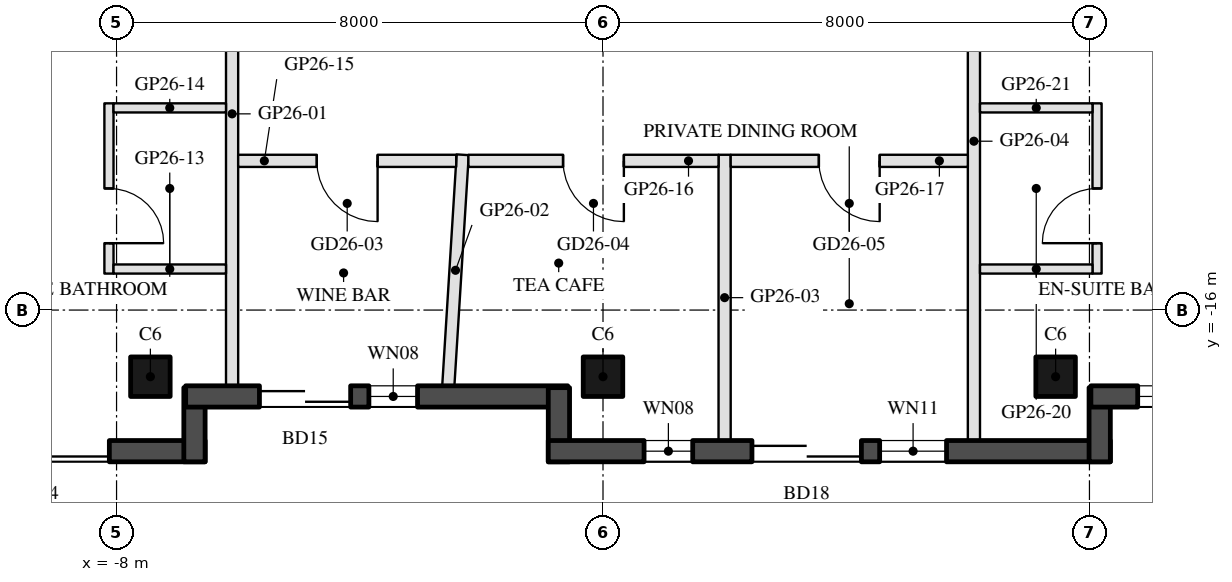
"""IFC4 building model, lengths in metres.
Left out: names, types, materials, properties, quantities, classifications, styles, units other than length and angle.
Written with IfcOpenShell. Run it as: python <this file> out.ifc"""

import sys

from ifc_helpers import new_model, si_unit, direction, frame, frame_2d, origin, origin_2d, place, context, subcontext, project, spatial, rectangle, hollow_rectangle, extrude, boolean, halfspace, element, fill, save


model = new_model("IFC4")
c1 = context("Model", 3, precision=1e-05, world=origin(), true_north=direction((0.0, 1.0)))
c2 = subcontext(c1, "Body", "Model", "MODEL_VIEW")
j1 = project(units=[si_unit("LENGTHUNIT", "METRE"), si_unit("PLANEANGLEUNIT", "RADIAN")], contexts=[c1])
p1 = place(None, origin())
s1 = spatial("IfcSite", under=j1, at=p1, CompositionType="ELEMENT")
p2 = place(p1, origin())
s2 = spatial("IfcBuilding", under=s1, at=p2, CompositionType="ELEMENT")
p3 = place(p2, frame((0.0, 0.0, 268.9)))
s3 = spatial("IfcBuildingStorey", under=s2, at=p3, CompositionType="ELEMENT", Elevation=268.9)
p4 = place(p3, frame((-7.444, -17.096, 0.0), z_axis=(0.0, 0.0, 1.0), x_axis=(-1.0, 0.0, 0.0)))
e1 = element("IfcColumn", 1, at=p4, inside=s3, PredefinedType="COLUMN", context=c2, shape_type="SweptSolid", body=[
    boolean("DIFFERENCE", extrude(hollow_rectangle(XDim=0.65, YDim=0.65, WallThickness=0.03, at=origin_2d()), origin(), (0.0, 0.0, 1.0), 3.7), halfspace(frame((0.0, 0.0, 0.04), z_axis=(0.0, 0.0, 1.0), x_axis=(1.0, 0.0, 0.0)), True)),
])
p5 = place(p3, frame((0.0, -17.096, 0.0), z_axis=(0.0, 0.0, 1.0), x_axis=(-1.0, 0.0, 0.0)))
e2 = element("IfcColumn", 2, at=p5, inside=s3, PredefinedType="COLUMN", context=c2, shape_type="SweptSolid", body=[
    boolean("DIFFERENCE", extrude(hollow_rectangle(XDim=0.65, YDim=0.65, WallThickness=0.03, at=origin_2d()), origin(), (0.0, 0.0, 1.0), 3.7), halfspace(frame((0.0, 0.0, 0.037), z_axis=(0.0, 0.0, 1.0), x_axis=(1.0, 0.0, 0.0)), True)),
])
p6 = place(p3, frame((7.444, -17.096, 0.0), z_axis=(0.0, 0.0, 1.0), x_axis=(-1.0, 0.0, 0.0)))
e3 = element("IfcColumn", 3, at=p6, inside=s3, PredefinedType="COLUMN", context=c2, shape_type="SweptSolid", body=[
    boolean("DIFFERENCE", extrude(hollow_rectangle(XDim=0.65, YDim=0.65, WallThickness=0.03, at=origin_2d()), origin(), (0.0, 0.0, 1.0), 3.7), halfspace(frame((0.0, 0.0, 0.04), z_axis=(0.0, 0.0, 1.0), x_axis=(1.0, 0.0, 0.0)), True)),
])
p7 = place(p3, frame((-17.729, -18.321, 0.0), z_axis=(0.0, 0.0, 1.0), x_axis=(1.0, 0.0, 0.0)))
e4 = element("IfcWall", 4, at=p7, inside=s3, PredefinedType="SOLIDWALL", context=c2, shape_type="SweptSolid", body=[
    extrude(rectangle(XDim=11.185, YDim=0.35, at=frame_2d((5.593, 0.0))), origin(), (0.0, 0.0, 1.0), 3.55),
])
p8 = place(p7, frame((0.381, 0.0, 0.3)))
e5 = element("IfcOpeningElement", 5, at=p8, cuts=e4, PredefinedType="OPENING", context=c2, shape_type="SweptSolid", body=[
    extrude(rectangle(XDim=1.7, YDim=2.65, at=frame_2d((0.85, 1.325))), frame((0.0, 0.185, 0.0), z_axis=(0.0, -1.0, 0.0), x_axis=(1.0, 0.0, 0.0)), (0.0, 0.0, 1.0), 0.37),
])
p9 = place(p7, frame((7.21, 0.0, 0.0)))
e6 = element("IfcOpeningElement", 6, at=p9, cuts=e4, PredefinedType="OPENING", context=c2, shape_type="SweptSolid", body=[
    extrude(rectangle(XDim=2.4, YDim=2.4, at=frame_2d((1.2, 1.2))), frame((0.0, 0.185, 0.0), z_axis=(0.0, -1.0, 0.0), x_axis=(1.0, 0.0, 0.0)), (0.0, 0.0, 1.0), 0.37),
])
p10 = place(p7, frame((3.516, 0.0, 0.3)))
e7 = element("IfcOpeningElement", 7, at=p10, cuts=e4, PredefinedType="OPENING", context=c2, shape_type="SweptSolid", body=[
    extrude(rectangle(XDim=1.5, YDim=2.65, at=frame_2d((0.75, 1.325))), frame((0.0, 0.185, 0.0), z_axis=(0.0, -1.0, 0.0), x_axis=(1.0, 0.0, 0.0)), (0.0, 0.0, 1.0), 0.37),
])
p11 = place(p7, frame((5.316, 0.0, 0.3)))
e8 = element("IfcOpeningElement", 8, at=p11, cuts=e4, PredefinedType="OPENING", context=c2, shape_type="SweptSolid", body=[
    extrude(rectangle(XDim=1.5, YDim=2.65, at=frame_2d((0.75, 1.325))), frame((0.0, 0.185, 0.0), z_axis=(0.0, -1.0, 0.0), x_axis=(1.0, 0.0, 0.0)), (0.0, 0.0, 1.0), 0.37),
])
p12 = place(p3, frame((-6.719, -18.496, 0.0), z_axis=(0.0, 0.0, 1.0), x_axis=(0.0, 1.0, 0.0)))
e9 = element("IfcWall", 9, at=p12, inside=s3, PredefinedType="SOLIDWALL", context=c2, shape_type="SweptSolid", body=[
    extrude(rectangle(XDim=1.22, YDim=0.35, at=frame_2d((0.61, 0.0))), origin(), (0.0, 0.0, 1.0), 3.55),
])
p13 = place(p3, frame((-6.864, -17.421, 0.0), z_axis=(0.0, 0.0, 1.0), x_axis=(1.0, 0.0, 0.0)))
e10 = element("IfcWall", 10, at=p13, inside=s3, PredefinedType="SOLIDWALL", context=c2, shape_type="SweptSolid", body=[
    extrude(rectangle(XDim=6.283, YDim=0.35, at=frame_2d((3.142, 0.0))), origin(), (0.0, 0.0, 1.0), 3.55),
])
p14 = place(p13, frame((1.213, 0.0, 0.0)))
e11 = element("IfcOpeningElement", 11, at=p14, cuts=e10, PredefinedType="OPENING", context=c2, shape_type="SweptSolid", body=[
    extrude(rectangle(XDim=1.5, YDim=2.4, at=frame_2d((0.75, 1.2))), frame((0.0, 0.185, 0.0), z_axis=(0.0, -1.0, 0.0), x_axis=(1.0, 0.0, 0.0)), (0.0, 0.0, 1.0), 0.37),
])
p15 = place(p13, frame((3.013, 0.0, 0.3)))
e12 = element("IfcOpeningElement", 12, at=p15, cuts=e10, PredefinedType="OPENING", context=c2, shape_type="SweptSolid", body=[
    extrude(rectangle(XDim=0.8, YDim=2.65, at=frame_2d((0.4, 1.325))), frame((0.0, 0.185, 0.0), z_axis=(0.0, -1.0, 0.0), x_axis=(1.0, 0.0, 0.0)), (0.0, 0.0, 1.0), 0.37),
])
p16 = place(p3, frame((-0.725, -17.276, 0.0), z_axis=(0.0, 0.0, 1.0), x_axis=(0.0, -1.0, 0.0)))
e13 = element("IfcWall", 13, at=p16, inside=s3, PredefinedType="SOLIDWALL", context=c2, shape_type="SweptSolid", body=[
    extrude(rectangle(XDim=1.22, YDim=0.35, at=frame_2d((0.61, 0.0))), origin(), (0.0, 0.0, 1.0), 3.55),
])
p17 = place(p3, frame((-0.9, -18.321, 0.0), z_axis=(0.0, 0.0, 1.0), x_axis=(1.0, 0.0, 0.0)))
e14 = element("IfcWall", 14, at=p17, inside=s3, PredefinedType="SOLIDWALL", context=c2, shape_type="SweptSolid", body=[
    extrude(rectangle(XDim=9.243, YDim=0.35, at=frame_2d((4.622, 0.0))), origin(), (0.0, 0.0, 1.0), 3.55),
])
p18 = place(p17, frame((1.575, 0.0, 0.3)))
e15 = element("IfcOpeningElement", 15, at=p18, cuts=e14, PredefinedType="OPENING", context=c2, shape_type="SweptSolid", body=[
    extrude(rectangle(XDim=0.8, YDim=2.65, at=frame_2d((0.4, 1.325))), frame((0.0, 0.185, 0.0), z_axis=(0.0, -1.0, 0.0), x_axis=(1.0, 0.0, 0.0)), (0.0, 0.0, 1.0), 0.37),
])
p19 = place(p17, frame((3.35, 0.0, 0.0)))
e16 = element("IfcOpeningElement", 16, at=p19, cuts=e14, PredefinedType="OPENING", context=c2, shape_type="SweptSolid", body=[
    extrude(rectangle(XDim=1.8, YDim=2.4, at=frame_2d((0.9, 1.2))), frame((0.0, 0.185, 0.0), z_axis=(0.0, -1.0, 0.0), x_axis=(1.0, 0.0, 0.0)), (0.0, 0.0, 1.0), 0.37),
])
p20 = place(p17, frame((5.45, 0.0, 0.3)))
e17 = element("IfcOpeningElement", 17, at=p20, cuts=e14, PredefinedType="OPENING", context=c2, shape_type="SweptSolid", body=[
    extrude(rectangle(XDim=1.1, YDim=2.65, at=frame_2d((0.55, 1.325))), frame((0.0, 0.185, 0.0), z_axis=(0.0, -1.0, 0.0), x_axis=(1.0, 0.0, 0.0)), (0.0, 0.0, 1.0), 0.37),
])
p21 = place(p3, frame((8.169, -18.496, 0.0), z_axis=(0.0, 0.0, 1.0), x_axis=(0.0, 1.0, 0.0)))
e18 = element("IfcWall", 18, at=p21, inside=s3, PredefinedType="SOLIDWALL", context=c2, shape_type="SweptSolid", body=[
    extrude(rectangle(XDim=1.22, YDim=0.35, at=frame_2d((0.61, 0.0))), origin(), (0.0, 0.0, 1.0), 3.55),
])
p22 = place(p3, frame((8.024, -17.421, 0.0), z_axis=(0.0, 0.0, 1.0), x_axis=(1.0, 0.0, 0.0)))
e19 = element("IfcWall", 19, at=p22, inside=s3, PredefinedType="SOLIDWALL", context=c2, shape_type="SweptSolid", body=[
    extrude(rectangle(XDim=6.283, YDim=0.35, at=frame_2d((3.142, 0.0))), origin(), (0.0, 0.0, 1.0), 3.55),
])
p23 = place(p22, frame((3.563, 0.0, 0.0)))
e20 = element("IfcOpeningElement", 20, at=p23, cuts=e19, PredefinedType="OPENING", context=c2, shape_type="SweptSolid", body=[
    extrude(rectangle(XDim=2.4, YDim=2.4, at=frame_2d((1.2, 1.2))), frame((0.0, 0.185, 0.0), z_axis=(0.0, -1.0, 0.0), x_axis=(1.0, 0.0, 0.0)), (0.0, 0.0, 1.0), 0.37),
])
p24 = place(p22, frame((0.77, 0.0, 0.3)))
e21 = element("IfcOpeningElement", 21, at=p24, cuts=e19, PredefinedType="OPENING", context=c2, shape_type="SweptSolid", body=[
    extrude(rectangle(XDim=2.4, YDim=2.65, at=frame_2d((1.2, 1.325))), frame((0.0, 0.185, 0.0), z_axis=(0.0, -1.0, 0.0), x_axis=(1.0, 0.0, 0.0)), (0.0, 0.0, 1.0), 0.37),
])
for number, where, z_axis, x_axis in (
    (22, (-8.547, -10.997, 0.0), (0.0, 0.0, 1.0), (-0.866, -0.5, 0.0)),
    (23, (8.547, -10.997, 0.0), (0.0, 0.0, 1.0), (0.866, -0.5, 0.0)),
):
    element("IfcWall", number, at=place(p3, frame(where, z_axis=z_axis, x_axis=x_axis)), inside=s3, PredefinedType="SHEAR", context=c2, shape_type="SweptSolid", body=[
        extrude(rectangle(XDim=13.031, YDim=0.5, at=frame_2d((6.516, 0.0))), origin(), (0.0, 0.0, 1.0), 3.5),
    ])
p25 = place(p3, frame((-6.1, -17.246, 0.0), z_axis=(0.0, 0.0, 1.0), x_axis=(0.0, 1.0, 0.0)))
e24 = element("IfcWall", 24, at=p25, inside=s3, PredefinedType="PARTITIONING", context=c2, shape_type="SweptSolid", body=[
    extrude(rectangle(XDim=8.946, YDim=0.2, at=frame_2d((4.473, 0.0))), origin(), (0.0, 0.0, 1.0), 3.16),
])
p26 = place(p3, frame((-2.544, -17.246, 0.0), z_axis=(0.0, 0.0, 1.0), x_axis=(0.062070892854, 0.998071743043, 0.0)))
e25 = element("IfcWall", 25, at=p26, inside=s3, PredefinedType="PARTITIONING", context=c2, shape_type="SweptSolid", body=[
    extrude(rectangle(XDim=3.807, YDim=0.2, at=frame_2d((1.904, 0.0))), origin(), (0.0, 0.0, 1.0), 3.16),
])
p27 = place(p3, frame((2.0, -18.146, 0.0), z_axis=(0.0, 0.0, 1.0), x_axis=(0.0, 1.0, 0.0)))
e26 = element("IfcWall", 26, at=p27, inside=s3, PredefinedType="PARTITIONING", context=c2, shape_type="SweptSolid", body=[
    extrude(rectangle(XDim=4.7, YDim=0.2, at=frame_2d((2.35, 0.0))), origin(), (0.0, 0.0, 1.0), 3.16),
])
p28 = place(p3, frame((6.1, -18.146, 0.0), z_axis=(0.0, 0.0, 1.0), x_axis=(0.0, 1.0, 0.0)))
e27 = element("IfcWall", 27, at=p28, inside=s3, PredefinedType="PARTITIONING", context=c2, shape_type="SweptSolid", body=[
    extrude(rectangle(XDim=9.846, YDim=0.2, at=frame_2d((4.923, 0.0))), origin(), (0.0, 0.0, 1.0), 3.16),
])
p29 = place(p3, frame((-8.125, -12.6, 0.0), z_axis=(0.0, 0.0, 1.0), x_axis=(0.0, -1.0, 0.0)))
e28 = element("IfcWall", 28, at=p29, inside=s3, PredefinedType="PARTITIONING", context=c2, shape_type="SweptSolid", body=[
    extrude(rectangle(XDim=2.8, YDim=0.15, at=frame_2d((1.4, 0.0))), origin(), (0.0, 0.0, 1.0), 3.55),
])
p30 = place(p29, frame((1.4, 0.0, 0.0)))
e29 = element("IfcOpeningElement", 29, at=p30, cuts=e28, PredefinedType="OPENING", context=c2, shape_type="SweptSolid", body=[
    extrude(rectangle(XDim=0.9, YDim=2.1, at=frame_2d((0.45, 1.05))), frame((0.0, 0.085, 0.0), z_axis=(0.0, -1.0, 0.0), x_axis=(1.0, 0.0, 0.0)), (0.0, 0.0, 1.0), 0.17),
])
for number, where, z_axis, x_axis in (
    (30, (-8.05, -15.325, 0.0), (0.0, 0.0, 1.0), (1.0, 0.0, 0.0)),
    (31, (-8.05, -12.675, 0.0), (0.0, 0.0, 1.0), (1.0, 0.0, 0.0)),
):
    element("IfcWall", number, at=place(p3, frame(where, z_axis=z_axis, x_axis=x_axis)), inside=s3, PredefinedType="PARTITIONING", context=c2, shape_type="SweptSolid", body=[
        extrude(rectangle(XDim=1.85, YDim=0.15, at=frame_2d((0.925, 0.0))), origin(), (0.0, 0.0, 1.0), 3.0),
    ])
p31 = place(p3, frame((-2.414, -13.546, 0.0), z_axis=(0.0, 0.0, 1.0), x_axis=(-1.0, 0.0, 0.0)))
e32 = element("IfcWall", 32, at=p31, inside=s3, PredefinedType="PARTITIONING", context=c2, shape_type="SweptSolid", body=[
    extrude(rectangle(XDim=3.586, YDim=0.2, at=frame_2d((1.793, 0.0))), origin(), (0.0, 0.0, 1.0), 3.0),
])
p32 = place(p31, frame((1.293, 0.0, 0.0)))
e33 = element("IfcOpeningElement", 33, at=p32, cuts=e32, PredefinedType="OPENING", context=c2, shape_type="SweptSolid", body=[
    extrude(rectangle(XDim=1.0, YDim=2.1, at=frame_2d((0.5, 1.05))), frame((0.0, 0.11, 0.0), z_axis=(0.0, -1.0, 0.0), x_axis=(1.0, 0.0, 0.0)), (0.0, 0.0, 1.0), 0.22),
])
p33 = place(p3, frame((1.9, -13.546, 0.0), z_axis=(0.0, 0.0, 1.0), x_axis=(-1.0, 0.0, 0.0)))
e34 = element("IfcWall", 34, at=p33, inside=s3, PredefinedType="PARTITIONING", context=c2, shape_type="SweptSolid", body=[
    extrude(rectangle(XDim=4.114, YDim=0.2, at=frame_2d((2.057, 0.0))), origin(), (0.0, 0.0, 1.0), 3.0),
])
p34 = place(p33, frame((1.557, 0.0, 0.0)))
e35 = element("IfcOpeningElement", 35, at=p34, cuts=e34, PredefinedType="OPENING", context=c2, shape_type="SweptSolid", body=[
    extrude(rectangle(XDim=1.0, YDim=2.1, at=frame_2d((0.5, 1.05))), frame((0.0, 0.11, 0.0), z_axis=(0.0, -1.0, 0.0), x_axis=(1.0, 0.0, 0.0)), (0.0, 0.0, 1.0), 0.22),
])
p35 = place(p3, frame((6.0, -13.546, 0.0), z_axis=(0.0, 0.0, 1.0), x_axis=(-1.0, 0.0, 0.0)))
e36 = element("IfcWall", 36, at=p35, inside=s3, PredefinedType="PARTITIONING", context=c2, shape_type="SweptSolid", body=[
    extrude(rectangle(XDim=3.9, YDim=0.2, at=frame_2d((1.95, 0.0))), origin(), (0.0, 0.0, 1.0), 3.0),
])
p36 = place(p35, frame((1.45, 0.0, 0.0)))
e37 = element("IfcOpeningElement", 37, at=p36, cuts=e36, PredefinedType="OPENING", context=c2, shape_type="SweptSolid", body=[
    extrude(rectangle(XDim=1.0, YDim=2.1, at=frame_2d((0.5, 1.05))), frame((0.0, 0.11, 0.0), z_axis=(0.0, -1.0, 0.0), x_axis=(1.0, 0.0, 0.0)), (0.0, 0.0, 1.0), 0.22),
])
p37 = place(p3, frame((8.125, -15.4, 0.0), z_axis=(0.0, 0.0, 1.0), x_axis=(0.0, 1.0, 0.0)))
e38 = element("IfcWall", 38, at=p37, inside=s3, PredefinedType="PARTITIONING", context=c2, shape_type="SweptSolid", body=[
    extrude(rectangle(XDim=2.8, YDim=0.15, at=frame_2d((1.4, 0.0))), origin(), (0.0, 0.0, 1.0), 3.55),
])
p38 = place(p37, frame((0.5, 0.0, 0.0)))
e39 = element("IfcOpeningElement", 39, at=p38, cuts=e38, PredefinedType="OPENING", context=c2, shape_type="SweptSolid", body=[
    extrude(rectangle(XDim=0.9, YDim=2.1, at=frame_2d((0.45, 1.05))), frame((0.0, 0.085, 0.0), z_axis=(0.0, -1.0, 0.0), x_axis=(1.0, 0.0, 0.0)), (0.0, 0.0, 1.0), 0.17),
])
for number, where, z_axis, x_axis in (
    (40, (6.2, -15.325, 0.0), (0.0, 0.0, 1.0), (1.0, 0.0, 0.0)),
    (41, (6.2, -12.675, 0.0), (0.0, 0.0, 1.0), (1.0, 0.0, 0.0)),
):
    element("IfcWall", number, at=place(p3, frame(where, z_axis=z_axis, x_axis=x_axis)), inside=s3, PredefinedType="PARTITIONING", context=c2, shape_type="SweptSolid", body=[
        extrude(rectangle(XDim=1.85, YDim=0.15, at=frame_2d((0.925, 0.0))), origin(), (0.0, 0.0, 1.0), 3.0),
    ])
p39 = place(p9, frame((2.4, 0.0, 0.0), z_axis=(0.0, 0.0, 1.0), x_axis=(-1.0, 0.0, 0.0)))
e42 = element("IfcDoor", 42, at=p39, inside=s3, OperationType="SLIDING_TO_LEFT", PredefinedType="DOOR", context=c2, shape_type="SweptSolid", body=[
    extrude(rectangle(XDim=2.4, YDim=2.4, at=frame_2d((1.2, 1.2))), frame((0.0, 0.025, 0.0), z_axis=(0.0, -1.0, 0.0), x_axis=(1.0, 0.0, 0.0)), (0.0, 0.0, 1.0), 0.05),
])
fill(e6, e42)
p40 = place(p14, frame((1.5, 0.0, 0.0), z_axis=(0.0, 0.0, 1.0), x_axis=(-1.0, 0.0, 0.0)))
e43 = element("IfcDoor", 43, at=p40, inside=s3, OperationType="SLIDING_TO_LEFT", PredefinedType="DOOR", context=c2, shape_type="SweptSolid", body=[
    extrude(rectangle(XDim=1.5, YDim=2.4, at=frame_2d((0.75, 1.2))), frame((0.0, 0.025, 0.0), z_axis=(0.0, -1.0, 0.0), x_axis=(1.0, 0.0, 0.0)), (0.0, 0.0, 1.0), 0.05),
])
fill(e11, e43)
p41 = place(p15, origin())
e44 = element("IfcWindow", 44, at=p41, inside=s3, PartitioningType="SINGLE_PANEL", PredefinedType="WINDOW", context=c2, shape_type="SweptSolid", body=[
    extrude(rectangle(XDim=0.8, YDim=2.65, at=frame_2d((0.4, 1.325))), frame((0.0, 0.03, 0.0), z_axis=(0.0, -1.0, 0.0), x_axis=(1.0, 0.0, 0.0)), (0.0, 0.0, 1.0), 0.06),
])
fill(e12, e44)
p42 = place(p18, origin())
e45 = element("IfcWindow", 45, at=p42, inside=s3, PartitioningType="SINGLE_PANEL", PredefinedType="WINDOW", context=c2, shape_type="SweptSolid", body=[
    extrude(rectangle(XDim=0.8, YDim=2.65, at=frame_2d((0.4, 1.325))), frame((0.0, 0.03, 0.0), z_axis=(0.0, -1.0, 0.0), x_axis=(1.0, 0.0, 0.0)), (0.0, 0.0, 1.0), 0.06),
])
fill(e15, e45)
p43 = place(p19, frame((1.8, 0.0, 0.0), z_axis=(0.0, 0.0, 1.0), x_axis=(-1.0, 0.0, 0.0)))
e46 = element("IfcDoor", 46, at=p43, inside=s3, OperationType="SLIDING_TO_LEFT", PredefinedType="DOOR", context=c2, shape_type="SweptSolid", body=[
    extrude(rectangle(XDim=1.8, YDim=2.4, at=frame_2d((0.9, 1.2))), frame((0.0, 0.025, 0.0), z_axis=(0.0, -1.0, 0.0), x_axis=(1.0, 0.0, 0.0)), (0.0, 0.0, 1.0), 0.05),
])
fill(e16, e46)
p44 = place(p20, origin())
e47 = element("IfcWindow", 47, at=p44, inside=s3, PartitioningType="SINGLE_PANEL", PredefinedType="WINDOW", context=c2, shape_type="SweptSolid", body=[
    extrude(rectangle(XDim=1.1, YDim=2.65, at=frame_2d((0.55, 1.325))), frame((0.0, 0.03, 0.0), z_axis=(0.0, -1.0, 0.0), x_axis=(1.0, 0.0, 0.0)), (0.0, 0.0, 1.0), 0.06),
])
fill(e17, e47)
p45 = place(p24, origin())
e48 = element("IfcWindow", 48, at=p45, inside=s3, PartitioningType="SINGLE_PANEL", PredefinedType="WINDOW", context=c2, shape_type="SweptSolid", body=[
    extrude(rectangle(XDim=2.4, YDim=2.65, at=frame_2d((1.2, 1.325))), frame((0.0, 0.03, 0.0), z_axis=(0.0, -1.0, 0.0), x_axis=(1.0, 0.0, 0.0)), (0.0, 0.0, 1.0), 0.06),
])
fill(e21, e48)
p46 = place(p30, origin())
e49 = element("IfcDoor", 49, at=p46, inside=s3, OperationType="SINGLE_SWING_RIGHT", PredefinedType="DOOR", context=c2, shape_type="SweptSolid", body=[
    extrude(rectangle(XDim=0.9, YDim=2.1, at=frame_2d((0.45, 1.05))), frame((0.0, 0.025, 0.0), z_axis=(0.0, -1.0, 0.0), x_axis=(1.0, 0.0, 0.0)), (0.0, 0.0, 1.0), 0.05),
])
fill(e29, e49)
p47 = place(p32, origin())
e50 = element("IfcDoor", 50, at=p47, inside=s3, OperationType="SINGLE_SWING_LEFT", PredefinedType="DOOR", context=c2, shape_type="SweptSolid", body=[
    extrude(rectangle(XDim=1.0, YDim=2.1, at=frame_2d((0.5, 1.05))), frame((0.0, 0.025, 0.0), z_axis=(0.0, -1.0, 0.0), x_axis=(1.0, 0.0, 0.0)), (0.0, 0.0, 1.0), 0.05),
])
fill(e33, e50)
p48 = place(p34, origin())
e51 = element("IfcDoor", 51, at=p48, inside=s3, OperationType="SINGLE_SWING_LEFT", PredefinedType="DOOR", context=c2, shape_type="SweptSolid", body=[
    extrude(rectangle(XDim=1.0, YDim=2.1, at=frame_2d((0.5, 1.05))), frame((0.0, 0.025, 0.0), z_axis=(0.0, -1.0, 0.0), x_axis=(1.0, 0.0, 0.0)), (0.0, 0.0, 1.0), 0.05),
])
fill(e35, e51)
p49 = place(p36, origin())
e52 = element("IfcDoor", 52, at=p49, inside=s3, OperationType="SINGLE_SWING_LEFT", PredefinedType="DOOR", context=c2, shape_type="SweptSolid", body=[
    extrude(rectangle(XDim=1.0, YDim=2.1, at=frame_2d((0.5, 1.05))), frame((0.0, 0.025, 0.0), z_axis=(0.0, -1.0, 0.0), x_axis=(1.0, 0.0, 0.0)), (0.0, 0.0, 1.0), 0.05),
])
fill(e37, e52)
p50 = place(p38, origin())
e53 = element("IfcDoor", 53, at=p50, inside=s3, OperationType="SINGLE_SWING_LEFT", PredefinedType="DOOR", context=c2, shape_type="SweptSolid", body=[
    extrude(rectangle(XDim=0.9, YDim=2.1, at=frame_2d((0.45, 1.05))), frame((0.0, 0.025, 0.0), z_axis=(0.0, -1.0, 0.0), x_axis=(1.0, 0.0, 0.0)), (0.0, 0.0, 1.0), 0.05),
])
fill(e39, e53)
save(model, sys.argv[1])
